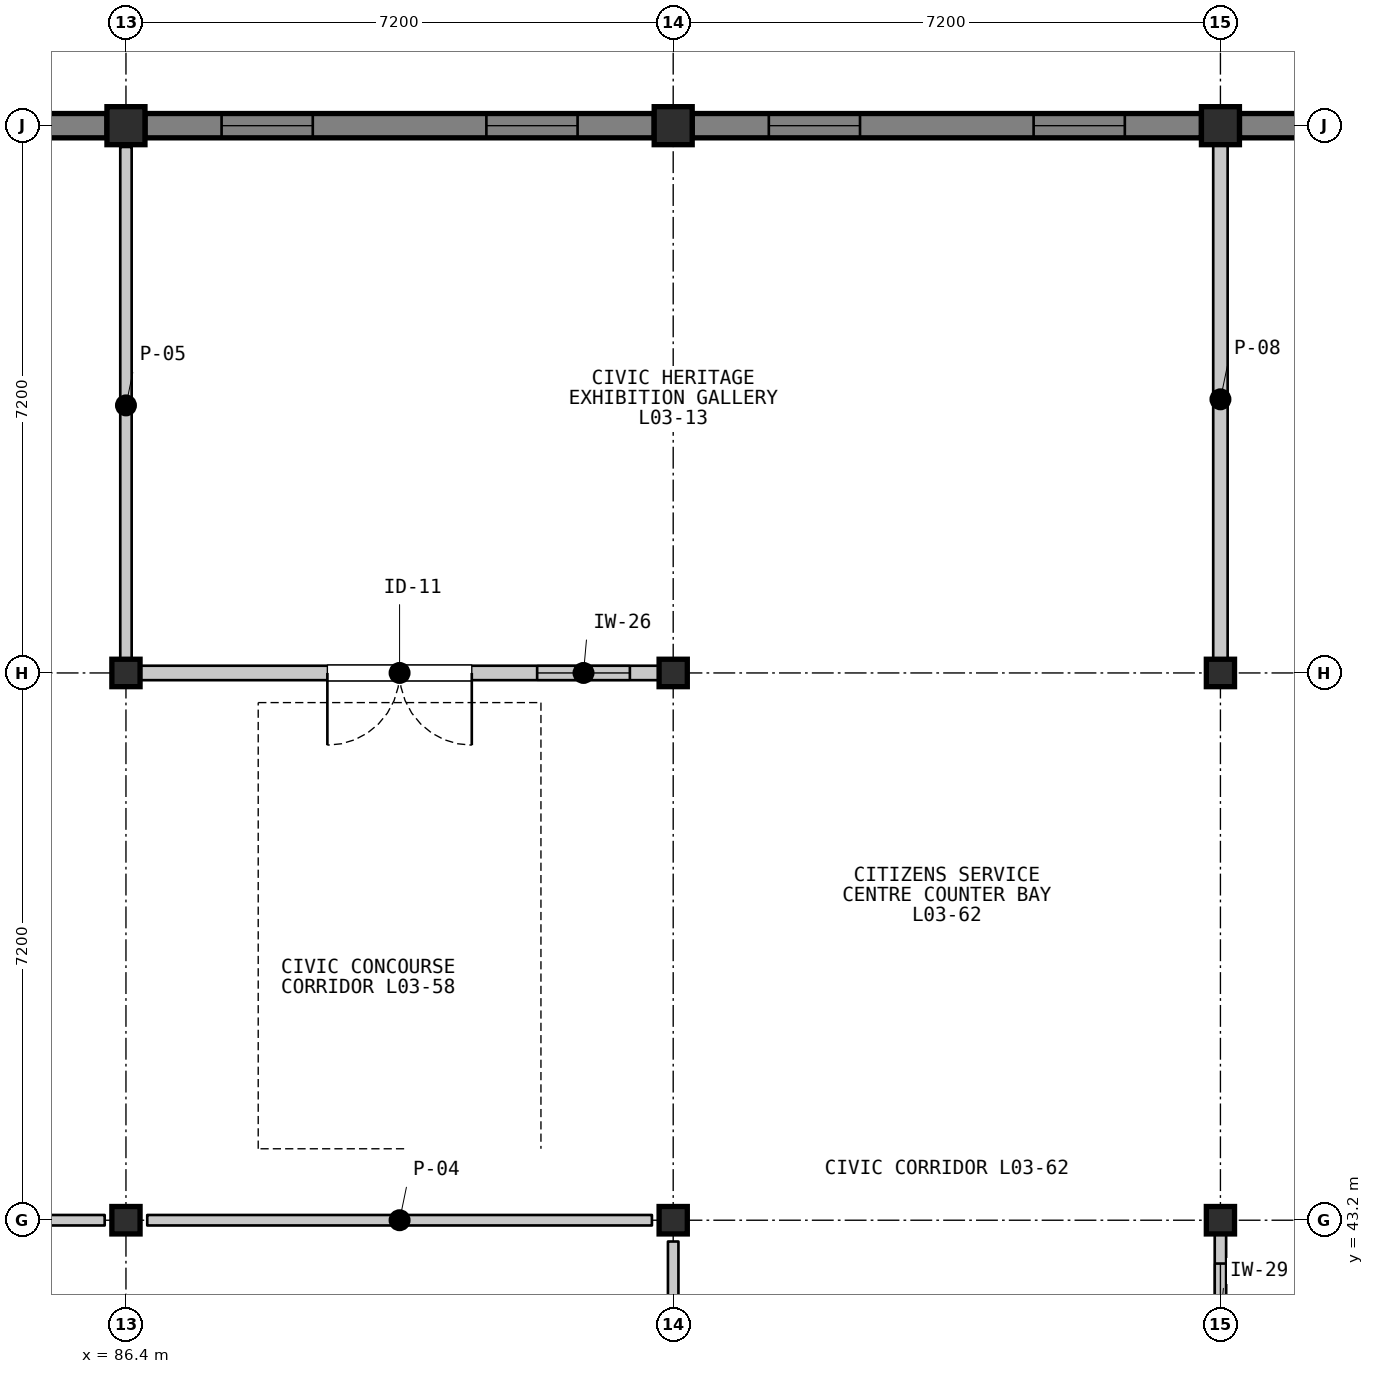
"""IFC4 building model, lengths in metres.
Left out: names, types, materials, properties, quantities, classifications, styles, units other than length and angle.
Written with IfcOpenShell. Run it as: python <this file> out.ifc"""

import sys

from ifc_helpers import new_model, si_unit, direction, frame, frame_2d, origin, origin_2d, place, context, subcontext, project, spatial, rectangle, i_section, extrude, element, fill, save


model = new_model("IFC4")
c1 = context("Model", 3, precision=1e-05, world=origin(), true_north=direction((0.0, 1.0)))
c2 = subcontext(c1, "Body", "Model", "MODEL_VIEW")
j1 = project(units=[si_unit("LENGTHUNIT", "METRE"), si_unit("PLANEANGLEUNIT", "RADIAN")], contexts=[c1])
p1 = place(None, origin())
s1 = spatial("IfcSite", under=j1, at=p1, CompositionType="ELEMENT")
p2 = place(p1, origin())
s2 = spatial("IfcBuilding", under=s1, at=p2, CompositionType="ELEMENT")
p3 = place(p2, frame((0.0, 0.0, 9.9)))
s3 = spatial("IfcBuildingStorey", under=s2, at=p3, CompositionType="ELEMENT", Elevation=9.9)
for number, where, z_axis, x_axis in (
    (1, (86.4, 43.2, 0.0), (0.0, 0.0, 1.0), (1.0, 0.0, 0.0)),
    (2, (86.4, 50.4, 0.0), (0.0, 0.0, 1.0), (1.0, 0.0, 0.0)),
):
    element("IfcColumn", number, at=place(p3, frame(where, z_axis=z_axis, x_axis=x_axis)), inside=s3, PredefinedType="COLUMN", context=c2, shape_type="SweptSolid", body=[
        extrude(i_section(OverallWidth=0.371, OverallDepth=0.361, WebThickness=0.012, FlangeThickness=0.02, FilletRadius=0.015, at=origin_2d()), origin(), (0.0, 0.0, 1.0), 4.2),
    ])
p4 = place(p3, frame((86.4, 57.6, 0.0), z_axis=(0.0, 0.0, 1.0), x_axis=(1.0, 0.0, 0.0)))
e3 = element("IfcColumn", 3, at=p4, inside=s3, PredefinedType="COLUMN", context=c2, shape_type="SweptSolid", body=[
    extrude(rectangle(XDim=0.5, YDim=0.5, at=origin_2d()), origin(), (0.0, 0.0, 1.0), 4.2),
])
for number, where, z_axis, x_axis in (
    (4, (93.6, 43.2, 0.0), (0.0, 0.0, 1.0), (1.0, 0.0, 0.0)),
    (5, (93.6, 50.4, 0.0), (0.0, 0.0, 1.0), (1.0, 0.0, 0.0)),
):
    element("IfcColumn", number, at=place(p3, frame(where, z_axis=z_axis, x_axis=x_axis)), inside=s3, PredefinedType="COLUMN", context=c2, shape_type="SweptSolid", body=[
        extrude(i_section(OverallWidth=0.371, OverallDepth=0.361, WebThickness=0.012, FlangeThickness=0.02, FilletRadius=0.015, at=origin_2d()), origin(), (0.0, 0.0, 1.0), 4.2),
    ])
p5 = place(p3, frame((93.6, 57.6, 0.0), z_axis=(0.0, 0.0, 1.0), x_axis=(1.0, 0.0, 0.0)))
e6 = element("IfcColumn", 6, at=p5, inside=s3, PredefinedType="COLUMN", context=c2, shape_type="SweptSolid", body=[
    extrude(rectangle(XDim=0.5, YDim=0.5, at=origin_2d()), origin(), (0.0, 0.0, 1.0), 4.2),
])
for number, where, z_axis, x_axis in (
    (7, (100.8, 43.2, 0.0), (0.0, 0.0, 1.0), (1.0, 0.0, 0.0)),
    (8, (100.8, 50.4, 0.0), (0.0, 0.0, 1.0), (1.0, 0.0, 0.0)),
):
    element("IfcColumn", number, at=place(p3, frame(where, z_axis=z_axis, x_axis=x_axis)), inside=s3, PredefinedType="COLUMN", context=c2, shape_type="SweptSolid", body=[
        extrude(i_section(OverallWidth=0.371, OverallDepth=0.361, WebThickness=0.012, FlangeThickness=0.02, FilletRadius=0.015, at=origin_2d()), origin(), (0.0, 0.0, 1.0), 4.2),
    ])
p6 = place(p3, frame((100.8, 57.6, 0.0), z_axis=(0.0, 0.0, 1.0), x_axis=(1.0, 0.0, 0.0)))
e9 = element("IfcColumn", 9, at=p6, inside=s3, PredefinedType="COLUMN", context=c2, shape_type="SweptSolid", body=[
    extrude(rectangle(XDim=0.5, YDim=0.5, at=origin_2d()), origin(), (0.0, 0.0, 1.0), 4.2),
])
p7 = place(p3, frame((79.45, 57.6, 0.0), z_axis=(0.0, 0.0, 1.0), x_axis=(1.0, 0.0, 0.0)))
e10 = element("IfcWall", 10, at=p7, inside=s3, PredefinedType="SOLIDWALL", context=c2, shape_type="SweptSolid", body=[
    extrude(rectangle(XDim=6.7, YDim=0.32, at=frame_2d((3.35, 0.0))), origin(), (0.0, 0.0, 1.0), 3.418),
])
p8 = place(p7, frame((1.008, 0.0, 0.95)))
e11 = element("IfcOpeningElement", 11, at=p8, cuts=e10, PredefinedType="OPENING", context=c2, shape_type="SweptSolid", body=[
    extrude(rectangle(XDim=1.2, YDim=1.7, at=frame_2d((0.6, 0.85))), frame((0.0, 0.17, 0.0), z_axis=(0.0, -1.0, 0.0), x_axis=(1.0, 0.0, 0.0)), (0.0, 0.0, 1.0), 0.34),
])
p9 = place(p7, frame((4.492, 0.0, 0.95)))
e12 = element("IfcOpeningElement", 12, at=p9, cuts=e10, PredefinedType="OPENING", context=c2, shape_type="SweptSolid", body=[
    extrude(rectangle(XDim=1.2, YDim=1.7, at=frame_2d((0.6, 0.85))), frame((0.0, 0.17, 0.0), z_axis=(0.0, -1.0, 0.0), x_axis=(1.0, 0.0, 0.0)), (0.0, 0.0, 1.0), 0.34),
])
p10 = place(p3, frame((86.65, 57.6, 0.0), z_axis=(0.0, 0.0, 1.0), x_axis=(1.0, 0.0, 0.0)))
e13 = element("IfcWall", 13, at=p10, inside=s3, PredefinedType="SOLIDWALL", context=c2, shape_type="SweptSolid", body=[
    extrude(rectangle(XDim=6.7, YDim=0.32, at=frame_2d((3.35, 0.0))), origin(), (0.0, 0.0, 1.0), 3.418),
])
p11 = place(p10, frame((1.008, 0.0, 0.95)))
e14 = element("IfcOpeningElement", 14, at=p11, cuts=e13, PredefinedType="OPENING", context=c2, shape_type="SweptSolid", body=[
    extrude(rectangle(XDim=1.2, YDim=1.7, at=frame_2d((0.6, 0.85))), frame((0.0, 0.17, 0.0), z_axis=(0.0, -1.0, 0.0), x_axis=(1.0, 0.0, 0.0)), (0.0, 0.0, 1.0), 0.34),
])
p12 = place(p10, frame((4.492, 0.0, 0.95)))
e15 = element("IfcOpeningElement", 15, at=p12, cuts=e13, PredefinedType="OPENING", context=c2, shape_type="SweptSolid", body=[
    extrude(rectangle(XDim=1.2, YDim=1.7, at=frame_2d((0.6, 0.85))), frame((0.0, 0.17, 0.0), z_axis=(0.0, -1.0, 0.0), x_axis=(1.0, 0.0, 0.0)), (0.0, 0.0, 1.0), 0.34),
])
p13 = place(p3, frame((93.85, 57.6, 0.0), z_axis=(0.0, 0.0, 1.0), x_axis=(1.0, 0.0, 0.0)))
e16 = element("IfcWall", 16, at=p13, inside=s3, PredefinedType="SOLIDWALL", context=c2, shape_type="SweptSolid", body=[
    extrude(rectangle(XDim=6.7, YDim=0.32, at=frame_2d((3.35, 0.0))), origin(), (0.0, 0.0, 1.0), 3.418),
])
p14 = place(p13, frame((1.008, 0.0, 0.95)))
e17 = element("IfcOpeningElement", 17, at=p14, cuts=e16, PredefinedType="OPENING", context=c2, shape_type="SweptSolid", body=[
    extrude(rectangle(XDim=1.2, YDim=1.7, at=frame_2d((0.6, 0.85))), frame((0.0, 0.17, 0.0), z_axis=(0.0, -1.0, 0.0), x_axis=(1.0, 0.0, 0.0)), (0.0, 0.0, 1.0), 0.34),
])
p15 = place(p13, frame((4.492, 0.0, 0.95)))
e18 = element("IfcOpeningElement", 18, at=p15, cuts=e16, PredefinedType="OPENING", context=c2, shape_type="SweptSolid", body=[
    extrude(rectangle(XDim=1.2, YDim=1.7, at=frame_2d((0.6, 0.85))), frame((0.0, 0.17, 0.0), z_axis=(0.0, -1.0, 0.0), x_axis=(1.0, 0.0, 0.0)), (0.0, 0.0, 1.0), 0.34),
])
p16 = place(p3, frame((101.05, 57.6, 0.0), z_axis=(0.0, 0.0, 1.0), x_axis=(1.0, 0.0, 0.0)))
e19 = element("IfcWall", 19, at=p16, inside=s3, PredefinedType="SOLIDWALL", context=c2, shape_type="SweptSolid", body=[
    extrude(rectangle(XDim=6.7, YDim=0.32, at=frame_2d((3.35, 0.0))), origin(), (0.0, 0.0, 1.0), 3.418),
])
p17 = place(p16, frame((1.008, 0.0, 0.95)))
e20 = element("IfcOpeningElement", 20, at=p17, cuts=e19, PredefinedType="OPENING", context=c2, shape_type="SweptSolid", body=[
    extrude(rectangle(XDim=1.2, YDim=1.7, at=frame_2d((0.6, 0.85))), frame((0.0, 0.17, 0.0), z_axis=(0.0, -1.0, 0.0), x_axis=(1.0, 0.0, 0.0)), (0.0, 0.0, 1.0), 0.34),
])
p18 = place(p16, frame((4.492, 0.0, 0.95)))
e21 = element("IfcOpeningElement", 21, at=p18, cuts=e19, PredefinedType="OPENING", context=c2, shape_type="SweptSolid", body=[
    extrude(rectangle(XDim=1.2, YDim=1.7, at=frame_2d((0.6, 0.85))), frame((0.0, 0.17, 0.0), z_axis=(0.0, -1.0, 0.0), x_axis=(1.0, 0.0, 0.0)), (0.0, 0.0, 1.0), 0.34),
])
p19 = place(p3, frame((79.48, 43.2, 0.0), z_axis=(0.0, 0.0, 1.0), x_axis=(1.0, 0.0, 0.0)))
e22 = element("IfcWall", 22, at=p19, inside=s3, PredefinedType="PARTITIONING", context=c2, shape_type="SweptSolid", body=[
    extrude(rectangle(XDim=6.64, YDim=0.138, at=frame_2d((3.32, 0.0))), origin(), (0.0, 0.0, 1.0), 3.408),
])
p20 = place(p19, frame((2.37, 0.0, 0.0)))
e23 = element("IfcOpeningElement", 23, at=p20, cuts=e22, PredefinedType="OPENING", context=c2, shape_type="SweptSolid", body=[
    extrude(rectangle(XDim=1.9, YDim=2.45, at=frame_2d((0.95, 1.225))), frame((0.0, 0.079, 0.0), z_axis=(0.0, -1.0, 0.0), x_axis=(1.0, 0.0, 0.0)), (0.0, 0.0, 1.0), 0.158),
])
p21 = place(p3, frame((86.68, 43.2, 0.0), z_axis=(0.0, 0.0, 1.0), x_axis=(1.0, 0.0, 0.0)))
e24 = element("IfcWall", 24, at=p21, inside=s3, PredefinedType="PARTITIONING", context=c2, shape_type="SweptSolid", body=[
    extrude(rectangle(XDim=6.64, YDim=0.138, at=frame_2d((3.32, 0.0))), origin(), (0.0, 0.0, 1.0), 3.408),
])
p22 = place(p3, frame((93.6, 42.92, 0.0), z_axis=(0.0, 0.0, 1.0), x_axis=(0.0, -1.0, 0.0)))
e25 = element("IfcWall", 25, at=p22, inside=s3, PredefinedType="PARTITIONING", context=c2, shape_type="SweptSolid", body=[
    extrude(rectangle(XDim=6.8, YDim=0.138, at=frame_2d((3.4, 0.0))), origin(), (0.0, 0.0, 1.0), 3.408),
])
p23 = place(p3, frame((86.4, 57.32, 0.0), z_axis=(0.0, 0.0, 1.0), x_axis=(0.0, -1.0, 0.0)))
e26 = element("IfcWall", 26, at=p23, inside=s3, PredefinedType="PARTITIONING", context=c2, shape_type="SweptSolid", body=[
    extrude(rectangle(XDim=6.8, YDim=0.15, at=frame_2d((3.4, 0.0))), origin(), (0.0, 0.0, 1.0), 3.408),
])
p24 = place(p3, frame((93.48, 50.4, 0.0), z_axis=(0.0, 0.0, 1.0), x_axis=(-1.0, 0.0, 0.0)))
e27 = element("IfcWall", 27, at=p24, inside=s3, PredefinedType="PARTITIONING", context=c2, shape_type="SweptSolid", body=[
    extrude(rectangle(XDim=6.96, YDim=0.19, at=frame_2d((3.48, 0.0))), origin(), (0.0, 0.0, 1.0), 3.408),
])
p25 = place(p24, frame((2.53, 0.0, 0.0)))
e28 = element("IfcOpeningElement", 28, at=p25, cuts=e27, PredefinedType="OPENING", context=c2, shape_type="SweptSolid", body=[
    extrude(rectangle(XDim=1.9, YDim=2.45, at=frame_2d((0.95, 1.225))), frame((0.0, 0.105, 0.0), z_axis=(0.0, -1.0, 0.0), x_axis=(1.0, 0.0, 0.0)), (0.0, 0.0, 1.0), 0.21),
])
p26 = place(p24, frame((0.45, 0.0, 1.05)))
e29 = element("IfcOpeningElement", 29, at=p26, cuts=e27, PredefinedType="OPENING", context=c2, shape_type="SweptSolid", body=[
    extrude(rectangle(XDim=1.22, YDim=0.92, at=frame_2d((0.61, 0.46))), frame((0.0, 0.105, 0.0), z_axis=(0.0, -1.0, 0.0), x_axis=(1.0, 0.0, 0.0)), (0.0, 0.0, 1.0), 0.21),
])
p27 = place(p3, frame((100.8, 57.48, 0.0), z_axis=(0.0, 0.0, 1.0), x_axis=(0.0, -1.0, 0.0)))
e30 = element("IfcWall", 30, at=p27, inside=s3, PredefinedType="PARTITIONING", context=c2, shape_type="SweptSolid", body=[
    extrude(rectangle(XDim=6.96, YDim=0.19, at=frame_2d((3.48, 0.0))), origin(), (0.0, 0.0, 1.0), 3.408),
])
p28 = place(p3, frame((100.8, 43.08, 0.0), z_axis=(0.0, 0.0, 1.0), x_axis=(0.0, -1.0, 0.0)))
e31 = element("IfcWall", 31, at=p28, inside=s3, PredefinedType="PARTITIONING", context=c2, shape_type="SweptSolid", body=[
    extrude(rectangle(XDim=6.96, YDim=0.15, at=frame_2d((3.48, 0.0))), origin(), (0.0, 0.0, 1.0), 3.408),
])
p29 = place(p28, frame((2.555, 0.0, 0.0)))
e32 = element("IfcOpeningElement", 32, at=p29, cuts=e31, PredefinedType="OPENING", context=c2, shape_type="SweptSolid", body=[
    extrude(rectangle(XDim=1.85, YDim=2.45, at=frame_2d((0.925, 1.225))), frame((0.0, 0.085, 0.0), z_axis=(0.0, -1.0, 0.0), x_axis=(1.0, 0.0, 0.0)), (0.0, 0.0, 1.0), 0.17),
])
p30 = place(p28, frame((0.45, 0.0, 1.05)))
e33 = element("IfcOpeningElement", 33, at=p30, cuts=e31, PredefinedType="OPENING", context=c2, shape_type="SweptSolid", body=[
    extrude(rectangle(XDim=1.52, YDim=0.96, at=frame_2d((0.76, 0.48))), frame((0.0, 0.085, 0.0), z_axis=(0.0, -1.0, 0.0), x_axis=(1.0, 0.0, 0.0)), (0.0, 0.0, 1.0), 0.17),
])
p31 = place(p11, origin())
e34 = element("IfcWindow", 34, at=p31, inside=s3, PartitioningType="SINGLE_PANEL", PredefinedType="WINDOW", context=c2, shape_type="SweptSolid", body=[
    extrude(rectangle(XDim=1.2, YDim=1.7, at=frame_2d((0.6, 0.85))), frame((0.0, 0.03, 0.0), z_axis=(0.0, -1.0, 0.0), x_axis=(1.0, 0.0, 0.0)), (0.0, 0.0, 1.0), 0.06),
])
fill(e14, e34)
p32 = place(p12, origin())
e35 = element("IfcWindow", 35, at=p32, inside=s3, PartitioningType="SINGLE_PANEL", PredefinedType="WINDOW", context=c2, shape_type="SweptSolid", body=[
    extrude(rectangle(XDim=1.2, YDim=1.7, at=frame_2d((0.6, 0.85))), frame((0.0, 0.03, 0.0), z_axis=(0.0, -1.0, 0.0), x_axis=(1.0, 0.0, 0.0)), (0.0, 0.0, 1.0), 0.06),
])
fill(e15, e35)
p33 = place(p14, origin())
e36 = element("IfcWindow", 36, at=p33, inside=s3, PartitioningType="SINGLE_PANEL", PredefinedType="WINDOW", context=c2, shape_type="SweptSolid", body=[
    extrude(rectangle(XDim=1.2, YDim=1.7, at=frame_2d((0.6, 0.85))), frame((0.0, 0.03, 0.0), z_axis=(0.0, -1.0, 0.0), x_axis=(1.0, 0.0, 0.0)), (0.0, 0.0, 1.0), 0.06),
])
fill(e17, e36)
p34 = place(p15, origin())
e37 = element("IfcWindow", 37, at=p34, inside=s3, PartitioningType="SINGLE_PANEL", PredefinedType="WINDOW", context=c2, shape_type="SweptSolid", body=[
    extrude(rectangle(XDim=1.2, YDim=1.7, at=frame_2d((0.6, 0.85))), frame((0.0, 0.03, 0.0), z_axis=(0.0, -1.0, 0.0), x_axis=(1.0, 0.0, 0.0)), (0.0, 0.0, 1.0), 0.06),
])
fill(e18, e37)
p35 = place(p25, origin())
e38 = element("IfcDoor", 38, at=p35, inside=s3, OperationType="DOUBLE_DOOR_SINGLE_SWING", PredefinedType="DOOR", context=c2, shape_type="SweptSolid", body=[
    extrude(rectangle(XDim=1.9, YDim=2.45, at=frame_2d((0.95, 1.225))), frame((0.0, 0.025, 0.0), z_axis=(0.0, -1.0, 0.0), x_axis=(1.0, 0.0, 0.0)), (0.0, 0.0, 1.0), 0.05),
])
fill(e28, e38)
p36 = place(p26, origin())
e39 = element("IfcWindow", 39, at=p36, inside=s3, PartitioningType="SINGLE_PANEL", PredefinedType="WINDOW", context=c2, shape_type="SweptSolid", body=[
    extrude(rectangle(XDim=1.22, YDim=0.92, at=frame_2d((0.61, 0.46))), frame((0.0, 0.03, 0.0), z_axis=(0.0, -1.0, 0.0), x_axis=(1.0, 0.0, 0.0)), (0.0, 0.0, 1.0), 0.06),
])
fill(e29, e39)
p37 = place(p30, origin())
e40 = element("IfcWindow", 40, at=p37, inside=s3, PartitioningType="SINGLE_PANEL", PredefinedType="WINDOW", context=c2, shape_type="SweptSolid", body=[
    extrude(rectangle(XDim=1.52, YDim=0.96, at=frame_2d((0.76, 0.48))), frame((0.0, 0.03, 0.0), z_axis=(0.0, -1.0, 0.0), x_axis=(1.0, 0.0, 0.0)), (0.0, 0.0, 1.0), 0.06),
])
fill(e33, e40)
save(model, sys.argv[1])
